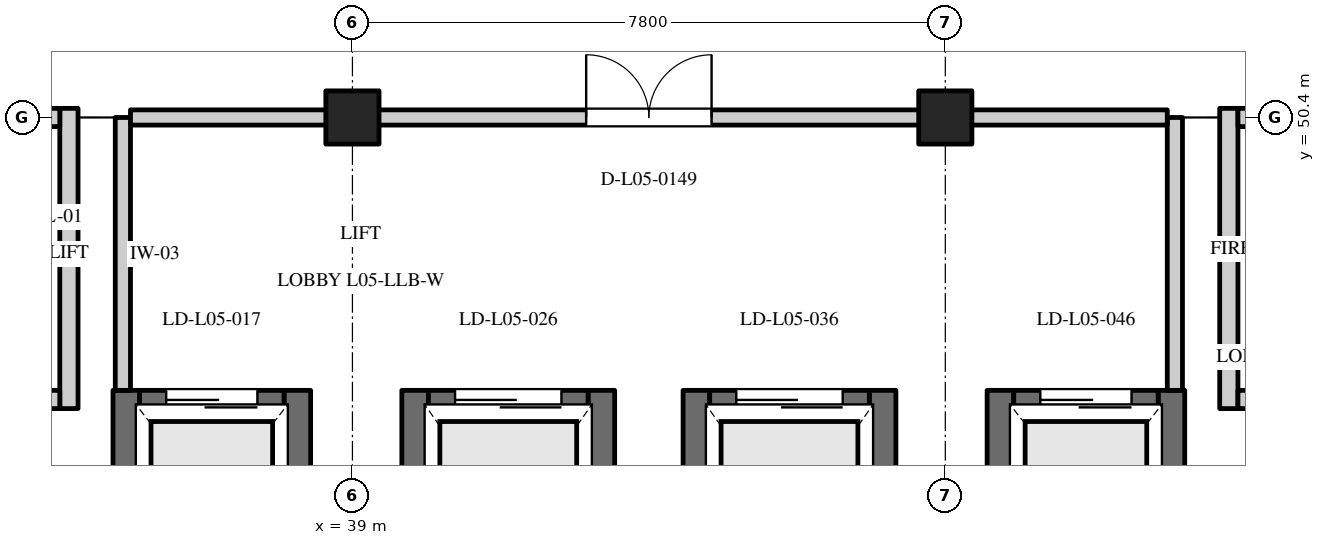
"""IFC4 building model, lengths in metres.
Left out: names, types, materials, properties, quantities, classifications, styles, units other than length and angle.
Written with IfcOpenShell. Run it as: python <this file> out.ifc"""

import sys

from ifc_helpers import new_model, si_unit, direction, frame, frame_2d, origin, origin_2d, place, context, subcontext, project, spatial, rectangle, extrude, element, fill, save


model = new_model("IFC4")
c1 = context("Model", 3, precision=1e-05, world=origin(), true_north=direction((0.0, 1.0)))
c2 = subcontext(c1, "Body", "Model", "MODEL_VIEW")
j1 = project(units=[si_unit("LENGTHUNIT", "METRE"), si_unit("PLANEANGLEUNIT", "RADIAN")], contexts=[c1])
p1 = place(None, origin())
s1 = spatial("IfcSite", under=j1, at=p1, CompositionType="ELEMENT")
p2 = place(p1, origin())
s2 = spatial("IfcBuilding", under=s1, at=p2, CompositionType="ELEMENT")
p3 = place(p2, frame((0.0, 0.0, 22.2)))
s3 = spatial("IfcBuildingStorey", under=s2, at=p3, CompositionType="ELEMENT", Elevation=22.2)
for number, where, z_axis, x_axis in (
    (1, (39.0, 50.4, 0.0), (0.0, 0.0, 1.0), (1.0, 0.0, 0.0)),
    (2, (46.8, 50.4, 0.0), (0.0, 0.0, 1.0), (1.0, 0.0, 0.0)),
):
    element("IfcColumn", number, at=place(p3, frame(where, z_axis=z_axis, x_axis=x_axis)), inside=s3, PredefinedType="COLUMN", context=c2, shape_type="SweptSolid", body=[
        extrude(rectangle(XDim=0.7, YDim=0.7, at=origin_2d()), origin(), (0.0, 0.0, 1.0), 3.9),
    ])
for number, where, z_axis, x_axis in (
    (3, (36.025, 43.36, 0.0), (0.0, 0.0, 1.0), (0.0, 1.0, 0.0)),
    (4, (38.275, 43.36, 0.0), (0.0, 0.0, 1.0), (0.0, 1.0, 0.0)),
):
    element("IfcWall", number, at=place(p3, frame(where, z_axis=z_axis, x_axis=x_axis)), inside=s3, PredefinedType="SHEAR", context=c2, shape_type="SweptSolid", body=[
        extrude(rectangle(XDim=3.45, YDim=0.35, at=frame_2d((1.725, 0.0))), origin(), (0.0, 0.0, 1.0), 3.9),
    ])
p4 = place(p3, frame((36.2, 46.635, 0.0), z_axis=(0.0, 0.0, 1.0), x_axis=(1.0, 0.0, 0.0)))
e5 = element("IfcWall", 5, at=p4, inside=s3, PredefinedType="SHEAR", context=c2, shape_type="SweptSolid", body=[
    extrude(rectangle(XDim=1.9, YDim=0.35, at=frame_2d((0.95, 0.0))), origin(), (0.0, 0.0, 1.0), 3.6),
])
p5 = place(p4, frame((0.35, 0.0, 0.0)))
e6 = element("IfcOpeningElement", 6, at=p5, cuts=e5, PredefinedType="OPENING", context=c2, shape_type="SweptSolid", body=[
    extrude(rectangle(XDim=1.2, YDim=2.2, at=frame_2d((0.6, 1.1))), frame((0.0, 0.187, 0.0), z_axis=(0.0, -1.0, 0.0), x_axis=(1.0, 0.0, 0.0)), (0.0, 0.0, 1.0), 0.374),
])
for number, where, z_axis, x_axis in (
    (7, (39.825, 42.76, 0.0), (0.0, 0.0, 1.0), (0.0, 1.0, 0.0)),
    (8, (42.275, 42.76, 0.0), (0.0, 0.0, 1.0), (0.0, 1.0, 0.0)),
):
    element("IfcWall", number, at=place(p3, frame(where, z_axis=z_axis, x_axis=x_axis)), inside=s3, PredefinedType="SHEAR", context=c2, shape_type="SweptSolid", body=[
        extrude(rectangle(XDim=4.05, YDim=0.35, at=frame_2d((2.025, 0.0))), origin(), (0.0, 0.0, 1.0), 3.9),
    ])
p6 = place(p3, frame((40.0, 46.635, 0.0), z_axis=(0.0, 0.0, 1.0), x_axis=(1.0, 0.0, 0.0)))
e9 = element("IfcWall", 9, at=p6, inside=s3, PredefinedType="SHEAR", context=c2, shape_type="SweptSolid", body=[
    extrude(rectangle(XDim=2.1, YDim=0.35, at=frame_2d((1.05, 0.0))), origin(), (0.0, 0.0, 1.0), 3.6),
])
p7 = place(p6, frame((0.35, 0.0, 0.0)))
e10 = element("IfcOpeningElement", 10, at=p7, cuts=e9, PredefinedType="OPENING", context=c2, shape_type="SweptSolid", body=[
    extrude(rectangle(XDim=1.4, YDim=2.2, at=frame_2d((0.7, 1.1))), frame((0.0, 0.187, 0.0), z_axis=(0.0, -1.0, 0.0), x_axis=(1.0, 0.0, 0.0)), (0.0, 0.0, 1.0), 0.374),
])
for number, where, z_axis, x_axis in (
    (11, (43.525, 42.76, 0.0), (0.0, 0.0, 1.0), (0.0, 1.0, 0.0)),
    (12, (45.975, 42.76, 0.0), (0.0, 0.0, 1.0), (0.0, 1.0, 0.0)),
):
    element("IfcWall", number, at=place(p3, frame(where, z_axis=z_axis, x_axis=x_axis)), inside=s3, PredefinedType="SHEAR", context=c2, shape_type="SweptSolid", body=[
        extrude(rectangle(XDim=4.05, YDim=0.35, at=frame_2d((2.025, 0.0))), origin(), (0.0, 0.0, 1.0), 3.9),
    ])
p8 = place(p3, frame((43.7, 46.635, 0.0), z_axis=(0.0, 0.0, 1.0), x_axis=(1.0, 0.0, 0.0)))
e13 = element("IfcWall", 13, at=p8, inside=s3, PredefinedType="SHEAR", context=c2, shape_type="SweptSolid", body=[
    extrude(rectangle(XDim=2.1, YDim=0.35, at=frame_2d((1.05, 0.0))), origin(), (0.0, 0.0, 1.0), 3.6),
])
p9 = place(p8, frame((0.35, 0.0, 0.0)))
e14 = element("IfcOpeningElement", 14, at=p9, cuts=e13, PredefinedType="OPENING", context=c2, shape_type="SweptSolid", body=[
    extrude(rectangle(XDim=1.4, YDim=2.2, at=frame_2d((0.7, 1.1))), frame((0.0, 0.187, 0.0), z_axis=(0.0, -1.0, 0.0), x_axis=(1.0, 0.0, 0.0)), (0.0, 0.0, 1.0), 0.374),
])
for number, where, z_axis, x_axis in (
    (15, (47.525, 43.36, 0.0), (0.0, 0.0, 1.0), (0.0, 1.0, 0.0)),
    (16, (49.775, 43.36, 0.0), (0.0, 0.0, 1.0), (0.0, 1.0, 0.0)),
):
    element("IfcWall", number, at=place(p3, frame(where, z_axis=z_axis, x_axis=x_axis)), inside=s3, PredefinedType="SHEAR", context=c2, shape_type="SweptSolid", body=[
        extrude(rectangle(XDim=3.45, YDim=0.35, at=frame_2d((1.725, 0.0))), origin(), (0.0, 0.0, 1.0), 3.9),
    ])
p10 = place(p3, frame((47.7, 46.635, 0.0), z_axis=(0.0, 0.0, 1.0), x_axis=(1.0, 0.0, 0.0)))
e17 = element("IfcWall", 17, at=p10, inside=s3, PredefinedType="SHEAR", context=c2, shape_type="SweptSolid", body=[
    extrude(rectangle(XDim=1.9, YDim=0.35, at=frame_2d((0.95, 0.0))), origin(), (0.0, 0.0, 1.0), 3.6),
])
p11 = place(p10, frame((0.35, 0.0, 0.0)))
e18 = element("IfcOpeningElement", 18, at=p11, cuts=e17, PredefinedType="OPENING", context=c2, shape_type="SweptSolid", body=[
    extrude(rectangle(XDim=1.2, YDim=2.2, at=frame_2d((0.6, 1.1))), frame((0.0, 0.187, 0.0), z_axis=(0.0, -1.0, 0.0), x_axis=(1.0, 0.0, 0.0)), (0.0, 0.0, 1.0), 0.374),
])
p12 = place(p3, frame((35.27, 46.57, 0.0), z_axis=(0.0, 0.0, 1.0), x_axis=(0.0, 1.0, 0.0)))
e19 = element("IfcWall", 19, at=p12, inside=s3, PredefinedType="STANDARD", context=c2, shape_type="SweptSolid", body=[
    extrude(rectangle(XDim=3.95, YDim=0.24, at=frame_2d((1.975, 0.0))), origin(), (0.0, 0.0, 1.0), 3.1),
])
p13 = place(p3, frame((34.6, 46.69, 0.0), z_axis=(0.0, 0.0, 1.0), x_axis=(1.0, 0.0, 0.0)))
e20 = element("IfcWall", 20, at=p13, inside=s3, PredefinedType="STANDARD", context=c2, shape_type="SweptSolid", body=[
    extrude(rectangle(XDim=0.55, YDim=0.24, at=frame_2d((0.275, 0.0))), origin(), (0.0, 0.0, 1.0), 3.1),
])
p14 = place(p3, frame((31.88, 50.4, 0.0), z_axis=(0.0, 0.0, 1.0), x_axis=(1.0, 0.0, 0.0)))
e21 = element("IfcWall", 21, at=p14, inside=s3, PredefinedType="STANDARD", context=c2, shape_type="SweptSolid", body=[
    extrude(rectangle(XDim=3.27, YDim=0.24, at=frame_2d((1.635, 0.0))), origin(), (0.0, 0.0, 1.0), 3.1),
])
p15 = place(p14, frame((0.91, 0.0, 0.0)))
e22 = element("IfcOpeningElement", 22, at=p15, cuts=e21, PredefinedType="OPENING", context=c2, shape_type="SweptSolid", body=[
    extrude(rectangle(XDim=1.45, YDim=2.2, at=frame_2d((0.725, 1.1))), frame((0.0, 0.132, 0.0), z_axis=(0.0, -1.0, 0.0), x_axis=(1.0, 0.0, 0.0)), (0.0, 0.0, 1.0), 0.264),
])
p16 = place(p3, frame((50.53, 46.57, 0.0), z_axis=(0.0, 0.0, 1.0), x_axis=(0.0, 1.0, 0.0)))
e23 = element("IfcWall", 23, at=p16, inside=s3, PredefinedType="STANDARD", context=c2, shape_type="SweptSolid", body=[
    extrude(rectangle(XDim=3.95, YDim=0.24, at=frame_2d((1.975, 0.0))), origin(), (0.0, 0.0, 1.0), 3.1),
])
p17 = place(p3, frame((50.65, 46.69, 0.0), z_axis=(0.0, 0.0, 1.0), x_axis=(1.0, 0.0, 0.0)))
e24 = element("IfcWall", 24, at=p17, inside=s3, PredefinedType="STANDARD", context=c2, shape_type="SweptSolid", body=[
    extrude(rectangle(XDim=0.5, YDim=0.24, at=frame_2d((0.25, 0.0))), origin(), (0.0, 0.0, 1.0), 3.1),
])
p18 = place(p3, frame((50.65, 50.4, 0.0), z_axis=(0.0, 0.0, 1.0), x_axis=(1.0, 0.0, 0.0)))
e25 = element("IfcWall", 25, at=p18, inside=s3, PredefinedType="STANDARD", context=c2, shape_type="SweptSolid", body=[
    extrude(rectangle(XDim=3.37, YDim=0.24, at=frame_2d((1.685, 0.0))), origin(), (0.0, 0.0, 1.0), 3.1),
])
p19 = place(p18, frame((0.96, 0.0, 0.0)))
e26 = element("IfcOpeningElement", 26, at=p19, cuts=e25, PredefinedType="OPENING", context=c2, shape_type="SweptSolid", body=[
    extrude(rectangle(XDim=1.45, YDim=2.2, at=frame_2d((0.725, 1.1))), frame((0.0, 0.132, 0.0), z_axis=(0.0, -1.0, 0.0), x_axis=(1.0, 0.0, 0.0)), (0.0, 0.0, 1.0), 0.264),
])
for number, where, z_axis, x_axis in (
    (27, (35.98, 46.81, 0.0), (0.0, 0.0, 1.0), (0.0, 1.0, 0.0)),
    (28, (49.82, 46.81, 0.0), (0.0, 0.0, 1.0), (0.0, 1.0, 0.0)),
):
    element("IfcWall", number, at=place(p3, frame(where, z_axis=z_axis, x_axis=x_axis)), inside=s3, PredefinedType="STANDARD", context=c2, shape_type="SweptSolid", body=[
        extrude(rectangle(XDim=3.59, YDim=0.2, at=frame_2d((1.795, 0.0))), origin(), (0.0, 0.0, 1.0), 3.1),
    ])
p20 = place(p3, frame((36.08, 50.4, 0.0), z_axis=(0.0, 0.0, 1.0), x_axis=(1.0, 0.0, 0.0)))
e29 = element("IfcWall", 29, at=p20, inside=s3, PredefinedType="STANDARD", context=c2, shape_type="SweptSolid", body=[
    extrude(rectangle(XDim=13.64, YDim=0.2, at=frame_2d((6.82, 0.0))), origin(), (0.0, 0.0, 1.0), 3.1),
])
p21 = place(p20, frame((5.995, 0.0, 0.0)))
e30 = element("IfcOpeningElement", 30, at=p21, cuts=e29, PredefinedType="OPENING", context=c2, shape_type="SweptSolid", body=[
    extrude(rectangle(XDim=1.65, YDim=2.25, at=frame_2d((0.825, 1.125))), frame((0.0, 0.112, 0.0), z_axis=(0.0, -1.0, 0.0), x_axis=(1.0, 0.0, 0.0)), (0.0, 0.0, 1.0), 0.224),
])
p22 = place(p5, origin())
e31 = element("IfcDoor", 31, at=p22, inside=s3, OperationType="SLIDING_TO_LEFT", PredefinedType="DOOR", context=c2, shape_type="SweptSolid", body=[
    extrude(rectangle(XDim=1.2, YDim=2.2, at=frame_2d((0.6, 1.1))), frame((0.0, 0.025, 0.0), z_axis=(0.0, -1.0, 0.0), x_axis=(1.0, 0.0, 0.0)), (0.0, 0.0, 1.0), 0.05),
])
fill(e6, e31)
p23 = place(p7, origin())
e32 = element("IfcDoor", 32, at=p23, inside=s3, OperationType="SLIDING_TO_LEFT", PredefinedType="DOOR", context=c2, shape_type="SweptSolid", body=[
    extrude(rectangle(XDim=1.4, YDim=2.2, at=frame_2d((0.7, 1.1))), frame((0.0, 0.025, 0.0), z_axis=(0.0, -1.0, 0.0), x_axis=(1.0, 0.0, 0.0)), (0.0, 0.0, 1.0), 0.05),
])
fill(e10, e32)
p24 = place(p9, origin())
e33 = element("IfcDoor", 33, at=p24, inside=s3, OperationType="SLIDING_TO_LEFT", PredefinedType="DOOR", context=c2, shape_type="SweptSolid", body=[
    extrude(rectangle(XDim=1.4, YDim=2.2, at=frame_2d((0.7, 1.1))), frame((0.0, 0.025, 0.0), z_axis=(0.0, -1.0, 0.0), x_axis=(1.0, 0.0, 0.0)), (0.0, 0.0, 1.0), 0.05),
])
fill(e14, e33)
p25 = place(p11, origin())
e34 = element("IfcDoor", 34, at=p25, inside=s3, OperationType="SLIDING_TO_LEFT", PredefinedType="DOOR", context=c2, shape_type="SweptSolid", body=[
    extrude(rectangle(XDim=1.2, YDim=2.2, at=frame_2d((0.6, 1.1))), frame((0.0, 0.025, 0.0), z_axis=(0.0, -1.0, 0.0), x_axis=(1.0, 0.0, 0.0)), (0.0, 0.0, 1.0), 0.05),
])
fill(e18, e34)
p26 = place(p21, origin())
e35 = element("IfcDoor", 35, at=p26, inside=s3, OperationType="DOUBLE_DOOR_SINGLE_SWING", PredefinedType="DOOR", context=c2, shape_type="SweptSolid", body=[
    extrude(rectangle(XDim=1.65, YDim=2.25, at=frame_2d((0.825, 1.125))), frame((0.0, 0.025, 0.0), z_axis=(0.0, -1.0, 0.0), x_axis=(1.0, 0.0, 0.0)), (0.0, 0.0, 1.0), 0.05),
])
fill(e30, e35)
save(model, sys.argv[1])
